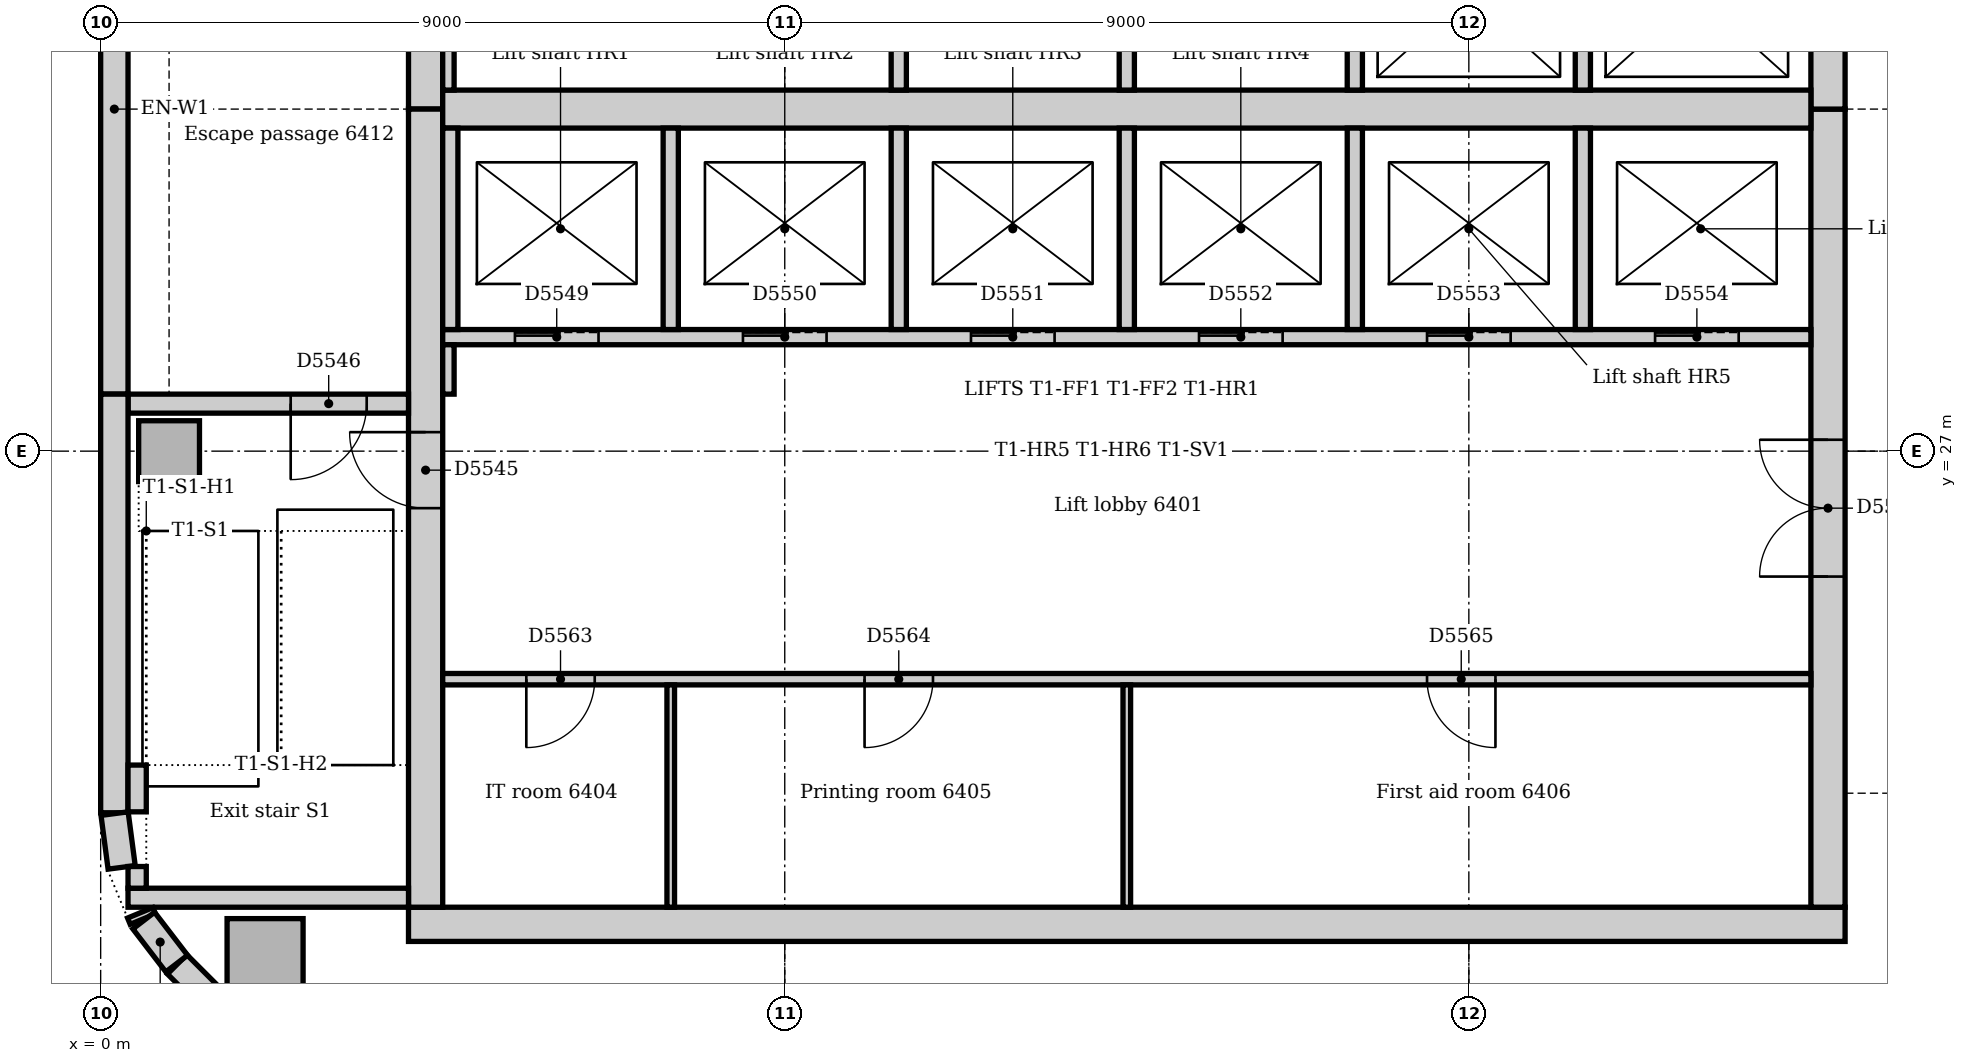
"""IFC4 building model, lengths in metres.
Left out: names, types, materials, properties, quantities, classifications, styles, units other than length and angle.
Written with IfcOpenShell. Run it as: python <this file> out.ifc"""

import sys

from ifc_helpers import new_model, si_unit, direction, frame, frame_2d, origin, origin_2d, place, context, subcontext, project, spatial, rectangle, extrude, element, fill, save


model = new_model("IFC4")
c1 = context("Model", 3, precision=1e-05, world=origin(), true_north=direction((0.0, 1.0)))
c2 = subcontext(c1, "Body", "Model", "MODEL_VIEW")
j1 = project(units=[si_unit("LENGTHUNIT", "METRE"), si_unit("PLANEANGLEUNIT", "RADIAN")], contexts=[c1])
p1 = place(None, origin())
s1 = spatial("IfcSite", under=j1, at=p1, CompositionType="ELEMENT")
p2 = place(p1, origin())
s2 = spatial("IfcBuilding", under=s1, at=p2, CompositionType="ELEMENT")
p3 = place(p2, frame((0.0, 0.0, 267.0)))
s3 = spatial("IfcBuildingStorey", under=s2, at=p3, CompositionType="ELEMENT", Elevation=267.0)
p4 = place(p3, frame((4.05, 20.775, 0.0), z_axis=(0.0, 0.0, 1.0), x_axis=(1.0, 0.0, 0.0)))
e1 = element("IfcWall", 1, at=p4, inside=s3, PredefinedType="SOLIDWALL", context=c2, shape_type="SweptSolid", body=[
    extrude(rectangle(XDim=18.9, YDim=0.45, at=frame_2d((9.45, 0.0))), origin(), (0.0, 0.0, 1.0), 4.0),
])
p5 = place(p3, frame((22.725, 21.0, 0.0), z_axis=(0.0, 0.0, 1.0), x_axis=(0.0, 1.0, 0.0)))
e2 = element("IfcWall", 2, at=p5, inside=s3, PredefinedType="SOLIDWALL", context=c2, shape_type="SweptSolid", body=[
    extrude(rectangle(XDim=10.5, YDim=0.45, at=frame_2d((5.25, 0.0))), origin(), (0.0, 0.0, 1.0), 4.0),
])
p6 = place(p5, frame((4.35, 0.0, 0.0)))
e3 = element("IfcOpeningElement", 3, at=p6, cuts=e2, PredefinedType="OPENING", context=c2, shape_type="SweptSolid", body=[
    extrude(rectangle(XDim=1.8, YDim=2.1, at=frame_2d((0.9, 1.05))), frame((0.0, 0.235, 0.0), z_axis=(0.0, -1.0, 0.0), x_axis=(1.0, 0.0, 0.0)), (0.0, 0.0, 1.0), 0.47),
])
p7 = place(p3, frame((22.725, 31.5, 0.0), z_axis=(0.0, 0.0, 1.0), x_axis=(0.0, 1.0, 0.0)))
e4 = element("IfcWall", 4, at=p7, inside=s3, PredefinedType="SOLIDWALL", context=c2, shape_type="SweptSolid", body=[
    extrude(rectangle(XDim=10.5, YDim=0.45, at=frame_2d((5.25, 0.0))), origin(), (0.0, 0.0, 1.0), 4.0),
])
p8 = place(p7, frame((3.15, 0.0, 0.0)))
e5 = element("IfcOpeningElement", 5, at=p8, cuts=e4, PredefinedType="OPENING", context=c2, shape_type="SweptSolid", body=[
    extrude(rectangle(XDim=1.0, YDim=2.1, at=frame_2d((0.5, 1.05))), frame((0.0, 0.235, 0.0), z_axis=(0.0, -1.0, 0.0), x_axis=(1.0, 0.0, 0.0)), (0.0, 0.0, 1.0), 0.47),
])
p9 = place(p7, frame((5.2, 0.0, 0.0)))
e6 = element("IfcOpeningElement", 6, at=p9, cuts=e4, PredefinedType="OPENING", context=c2, shape_type="SweptSolid", body=[
    extrude(rectangle(XDim=1.0, YDim=2.1, at=frame_2d((0.5, 1.05))), frame((0.0, 0.235, 0.0), z_axis=(0.0, -1.0, 0.0), x_axis=(1.0, 0.0, 0.0)), (0.0, 0.0, 1.0), 0.47),
])
p10 = place(p3, frame((4.275, 42.0, 0.0), z_axis=(0.0, 0.0, 1.0), x_axis=(0.0, -1.0, 0.0)))
e7 = element("IfcWall", 7, at=p10, inside=s3, PredefinedType="SOLIDWALL", context=c2, shape_type="SweptSolid", body=[
    extrude(rectangle(XDim=10.5, YDim=0.45, at=frame_2d((5.25, 0.0))), origin(), (0.0, 0.0, 1.0), 4.0),
])
p11 = place(p10, frame((5.3, 0.0, 0.0)))
e8 = element("IfcOpeningElement", 8, at=p11, cuts=e7, PredefinedType="OPENING", context=c2, shape_type="SweptSolid", body=[
    extrude(rectangle(XDim=1.0, YDim=2.1, at=frame_2d((0.5, 1.05))), frame((0.0, 0.235, 0.0), z_axis=(0.0, -1.0, 0.0), x_axis=(1.0, 0.0, 0.0)), (0.0, 0.0, 1.0), 0.47),
])
p12 = place(p3, frame((4.275, 31.5, 0.0), z_axis=(0.0, 0.0, 1.0), x_axis=(0.0, -1.0, 0.0)))
e9 = element("IfcWall", 9, at=p12, inside=s3, PredefinedType="SOLIDWALL", context=c2, shape_type="SweptSolid", body=[
    extrude(rectangle(XDim=10.5, YDim=0.45, at=frame_2d((5.25, 0.0))), origin(), (0.0, 0.0, 1.0), 4.0),
])
p13 = place(p12, frame((4.25, 0.0, 0.0)))
e10 = element("IfcOpeningElement", 10, at=p13, cuts=e9, PredefinedType="OPENING", context=c2, shape_type="SweptSolid", body=[
    extrude(rectangle(XDim=1.0, YDim=2.1, at=frame_2d((0.5, 1.05))), frame((0.0, 0.235, 0.0), z_axis=(0.0, -1.0, 0.0), x_axis=(1.0, 0.0, 0.0)), (0.0, 0.0, 1.0), 0.47),
])
p14 = place(p3, frame((4.5, 31.5, 0.0), z_axis=(0.0, 0.0, 1.0), x_axis=(1.0, 0.0, 0.0)))
e11 = element("IfcWall", 11, at=p14, inside=s3, PredefinedType="SOLIDWALL", context=c2, shape_type="SweptSolid", body=[
    extrude(rectangle(XDim=18.0, YDim=0.5, at=frame_2d((9.0, 0.0))), origin(), (0.0, 0.0, 1.0), 4.0),
])
p15 = place(p3, frame((0.36, 21.125, 0.0), z_axis=(0.0, 0.0, 1.0), x_axis=(1.0, 0.0, 0.0)))
e12 = element("IfcWall", 12, at=p15, inside=s3, PredefinedType="SOLIDWALL", context=c2, shape_type="SweptSolid", body=[
    extrude(rectangle(XDim=3.69, YDim=0.25, at=frame_2d((1.845, 0.0))), origin(), (0.0, 0.0, 1.0), 4.0),
])
p16 = place(p3, frame((4.05, 27.625, 0.0), z_axis=(0.0, 0.0, 1.0), x_axis=(-1.0, 0.0, 0.0)))
e13 = element("IfcWall", 13, at=p16, inside=s3, PredefinedType="SOLIDWALL", context=c2, shape_type="SweptSolid", body=[
    extrude(rectangle(XDim=3.69, YDim=0.25, at=frame_2d((1.845, 0.0))), origin(), (0.0, 0.0, 1.0), 4.0),
])
p17 = place(p16, frame((0.55, 0.0, 0.0)))
e14 = element("IfcOpeningElement", 14, at=p17, cuts=e13, PredefinedType="OPENING", context=c2, shape_type="SweptSolid", body=[
    extrude(rectangle(XDim=1.0, YDim=2.1, at=frame_2d((0.5, 1.05))), frame((0.0, 0.135, 0.0), z_axis=(0.0, -1.0, 0.0), x_axis=(1.0, 0.0, 0.0)), (0.0, 0.0, 1.0), 0.27),
])
p18 = place(p3, frame((2.163, 20.35, 0.0), z_axis=(0.0, 0.0, 1.0), x_axis=(1.0, 0.0, 0.0)))
e15 = element("IfcColumn", 15, at=p18, inside=s3, PredefinedType="COLUMN", context=c2, shape_type="SweptSolid", body=[
    extrude(rectangle(XDim=1.0, YDim=1.0, at=origin_2d()), origin(), (0.0, 0.0, 1.0), 3.85),
])
p19 = place(p3, frame((0.9, 27.0, 0.0), z_axis=(0.0, 0.0, 1.0), x_axis=(1.0, 0.0, 0.0)))
e16 = element("IfcColumn", 16, at=p19, inside=s3, PredefinedType="COLUMN", context=c2, shape_type="SweptSolid", body=[
    extrude(rectangle(XDim=0.8, YDim=0.8, at=origin_2d()), origin(), (0.0, 0.0, 1.0), 4.0),
])
p20 = place(p3, frame((0.18, 35.25, 0.0), z_axis=(0.0, 0.0, 1.0), x_axis=(0.0, -1.0, 0.0)))
e17 = element("IfcWall", 17, at=p20, inside=s3, PredefinedType="STANDARD", context=c2, shape_type="SweptSolid", body=[
    extrude(rectangle(XDim=7.5, YDim=0.36, at=frame_2d((3.75, 0.0))), origin(), (0.0, 0.0, 1.0), 3.85),
])
p21 = place(p3, frame((0.18, 27.75, 0.0), z_axis=(0.0, 0.0, 1.0), x_axis=(0.0, -1.0, 0.0)))
e18 = element("IfcWall", 18, at=p21, inside=s3, PredefinedType="STANDARD", context=c2, shape_type="SweptSolid", body=[
    extrude(rectangle(XDim=5.507, YDim=0.36, at=frame_2d((2.754, 0.0))), origin(), (0.0, 0.0, 1.0), 3.85),
])
p22 = place(p3, frame((1.006, 20.249, 0.0), z_axis=(0.0, 0.0, 1.0), x_axis=(0.707106781187, -0.707106781187, 0.0)))
e19 = element("IfcWall", 19, at=p22, inside=s3, PredefinedType="STANDARD", context=c2, shape_type="SweptSolid", body=[
    extrude(rectangle(XDim=1.757, YDim=0.36, at=frame_2d((0.879, 0.0))), origin(), (0.0, 0.0, 1.0), 3.85),
])
p23 = place(p3, frame((0.183, 22.231, 0.0), z_axis=(0.0, 0.0, 1.0), x_axis=(0.13055608231, -0.99144092581, 0.0)))
e20 = element("IfcWall", 20, at=p23, inside=s3, PredefinedType="STANDARD", context=c2, shape_type="SweptSolid", body=[
    extrude(rectangle(XDim=0.713, YDim=0.36, at=frame_2d((0.356, 0.0))), origin(), (0.0, 0.0, 1.0), 3.85),
])
p24 = place(p3, frame((0.521, 20.927, 0.0), z_axis=(0.0, 0.0, 1.0), x_axis=(0.382549378284, -0.923935048136, 0.0)))
e21 = element("IfcWall", 21, at=p24, inside=s3, PredefinedType="STANDARD", context=c2, shape_type="SweptSolid", body=[
    extrude(rectangle(XDim=0.089, YDim=0.36, at=frame_2d((0.045, 0.0))), origin(), (0.0, 0.0, 1.0), 3.85),
])
p25 = place(p3, frame((0.566, 20.825, 0.0), z_axis=(0.0, 0.0, 1.0), x_axis=(0.608802368033, -0.793321924995, 0.0)))
e22 = element("IfcWall", 22, at=p25, inside=s3, PredefinedType="STANDARD", context=c2, shape_type="SweptSolid", body=[
    extrude(rectangle(XDim=0.713, YDim=0.36, at=frame_2d((0.357, 0.0))), origin(), (0.0, 0.0, 1.0), 3.85),
])
p26 = place(p3, frame((0.48, 21.25, 0.0), z_axis=(0.0, 0.0, 1.0), x_axis=(0.0, 1.0, 0.0)))
e23 = element("IfcWall", 23, at=p26, inside=s3, PredefinedType="STANDARD", context=c2, shape_type="SweptSolid", body=[
    extrude(rectangle(XDim=0.285, YDim=0.24, at=frame_2d((0.143, 0.0))), origin(), (0.0, 0.0, 1.0), 4.0),
])
p27 = place(p3, frame((0.48, 22.255, 0.0), z_axis=(0.0, 0.0, 1.0), x_axis=(0.0, 1.0, 0.0)))
e24 = element("IfcWall", 24, at=p27, inside=s3, PredefinedType="STANDARD", context=c2, shape_type="SweptSolid", body=[
    extrude(rectangle(XDim=0.615, YDim=0.24, at=frame_2d((0.307, 0.0))), origin(), (0.0, 0.0, 1.0), 4.0),
])
p28 = place(p3, frame((4.5, 28.5, 0.0), z_axis=(0.0, 0.0, 1.0), x_axis=(1.0, 0.0, 0.0)))
e25 = element("IfcWall", 25, at=p28, inside=s3, PredefinedType="PARTITIONING", context=c2, shape_type="SweptSolid", body=[
    extrude(rectangle(XDim=18.0, YDim=0.2, at=frame_2d((9.0, 0.0))), origin(), (0.0, 0.0, 1.0), 3.85),
])
p29 = place(p28, frame((0.95, 0.0, 0.0)))
e26 = element("IfcOpeningElement", 26, at=p29, cuts=e25, PredefinedType="OPENING", context=c2, shape_type="SweptSolid", body=[
    extrude(rectangle(XDim=1.1, YDim=2.1, at=frame_2d((0.55, 1.05))), frame((0.0, 0.11, 0.0), z_axis=(0.0, -1.0, 0.0), x_axis=(1.0, 0.0, 0.0)), (0.0, 0.0, 1.0), 0.22),
])
p30 = place(p28, frame((3.95, 0.0, 0.0)))
e27 = element("IfcOpeningElement", 27, at=p30, cuts=e25, PredefinedType="OPENING", context=c2, shape_type="SweptSolid", body=[
    extrude(rectangle(XDim=1.1, YDim=2.1, at=frame_2d((0.55, 1.05))), frame((0.0, 0.11, 0.0), z_axis=(0.0, -1.0, 0.0), x_axis=(1.0, 0.0, 0.0)), (0.0, 0.0, 1.0), 0.22),
])
p31 = place(p28, frame((6.95, 0.0, 0.0)))
e28 = element("IfcOpeningElement", 28, at=p31, cuts=e25, PredefinedType="OPENING", context=c2, shape_type="SweptSolid", body=[
    extrude(rectangle(XDim=1.1, YDim=2.1, at=frame_2d((0.55, 1.05))), frame((0.0, 0.11, 0.0), z_axis=(0.0, -1.0, 0.0), x_axis=(1.0, 0.0, 0.0)), (0.0, 0.0, 1.0), 0.22),
])
p32 = place(p28, frame((9.95, 0.0, 0.0)))
e29 = element("IfcOpeningElement", 29, at=p32, cuts=e25, PredefinedType="OPENING", context=c2, shape_type="SweptSolid", body=[
    extrude(rectangle(XDim=1.1, YDim=2.1, at=frame_2d((0.55, 1.05))), frame((0.0, 0.11, 0.0), z_axis=(0.0, -1.0, 0.0), x_axis=(1.0, 0.0, 0.0)), (0.0, 0.0, 1.0), 0.22),
])
p33 = place(p28, frame((12.95, 0.0, 0.0)))
e30 = element("IfcOpeningElement", 30, at=p33, cuts=e25, PredefinedType="OPENING", context=c2, shape_type="SweptSolid", body=[
    extrude(rectangle(XDim=1.1, YDim=2.1, at=frame_2d((0.55, 1.05))), frame((0.0, 0.11, 0.0), z_axis=(0.0, -1.0, 0.0), x_axis=(1.0, 0.0, 0.0)), (0.0, 0.0, 1.0), 0.22),
])
p34 = place(p28, frame((15.95, 0.0, 0.0)))
e31 = element("IfcOpeningElement", 31, at=p34, cuts=e25, PredefinedType="OPENING", context=c2, shape_type="SweptSolid", body=[
    extrude(rectangle(XDim=1.1, YDim=2.1, at=frame_2d((0.55, 1.05))), frame((0.0, 0.11, 0.0), z_axis=(0.0, -1.0, 0.0), x_axis=(1.0, 0.0, 0.0)), (0.0, 0.0, 1.0), 0.22),
])
for number, where, z_axis, x_axis in (
    (32, (10.5, 28.6, 0.0), (0.0, 0.0, 1.0), (0.0, 1.0, 0.0)),
    (33, (10.5, 31.75, 0.0), (0.0, 0.0, 1.0), (0.0, 1.0, 0.0)),
    (34, (13.5, 28.6, 0.0), (0.0, 0.0, 1.0), (0.0, 1.0, 0.0)),
    (35, (13.5, 31.75, 0.0), (0.0, 0.0, 1.0), (0.0, 1.0, 0.0)),
    (36, (16.5, 28.6, 0.0), (0.0, 0.0, 1.0), (0.0, 1.0, 0.0)),
    (37, (16.5, 31.75, 0.0), (0.0, 0.0, 1.0), (0.0, 1.0, 0.0)),
    (38, (19.5, 28.6, 0.0), (0.0, 0.0, 1.0), (0.0, 1.0, 0.0)),
    (39, (19.5, 31.75, 0.0), (0.0, 0.0, 1.0), (0.0, 1.0, 0.0)),
    (40, (4.6, 28.6, 0.0), (0.0, 0.0, 1.0), (0.0, 1.0, 0.0)),
    (41, (7.5, 28.6, 0.0), (0.0, 0.0, 1.0), (0.0, 1.0, 0.0)),
):
    element("IfcWall", number, at=place(p3, frame(where, z_axis=z_axis, x_axis=x_axis)), inside=s3, PredefinedType="PARTITIONING", context=c2, shape_type="SweptSolid", body=[
        extrude(rectangle(XDim=2.65, YDim=0.2, at=frame_2d((1.325, 0.0))), origin(), (0.0, 0.0, 1.0), 3.85),
    ])
p35 = place(p3, frame((4.5, 24.0, 0.0), z_axis=(0.0, 0.0, 1.0), x_axis=(1.0, 0.0, 0.0)))
e42 = element("IfcWall", 42, at=p35, inside=s3, PredefinedType="PARTITIONING", context=c2, shape_type="SweptSolid", body=[
    extrude(rectangle(XDim=18.0, YDim=0.15, at=frame_2d((9.0, 0.0))), origin(), (0.0, 0.0, 1.0), 3.85),
])
p36 = place(p35, frame((1.1, 0.0, 0.0)))
e43 = element("IfcOpeningElement", 43, at=p36, cuts=e42, PredefinedType="OPENING", context=c2, shape_type="SweptSolid", body=[
    extrude(rectangle(XDim=0.9, YDim=2.1, at=frame_2d((0.45, 1.05))), frame((0.0, 0.085, 0.0), z_axis=(0.0, -1.0, 0.0), x_axis=(1.0, 0.0, 0.0)), (0.0, 0.0, 1.0), 0.17),
])
p37 = place(p35, frame((5.55, 0.0, 0.0)))
e44 = element("IfcOpeningElement", 44, at=p37, cuts=e42, PredefinedType="OPENING", context=c2, shape_type="SweptSolid", body=[
    extrude(rectangle(XDim=0.9, YDim=2.1, at=frame_2d((0.45, 1.05))), frame((0.0, 0.085, 0.0), z_axis=(0.0, -1.0, 0.0), x_axis=(1.0, 0.0, 0.0)), (0.0, 0.0, 1.0), 0.17),
])
p38 = place(p35, frame((12.95, 0.0, 0.0)))
e45 = element("IfcOpeningElement", 45, at=p38, cuts=e42, PredefinedType="OPENING", context=c2, shape_type="SweptSolid", body=[
    extrude(rectangle(XDim=0.9, YDim=2.1, at=frame_2d((0.45, 1.05))), frame((0.0, 0.085, 0.0), z_axis=(0.0, -1.0, 0.0), x_axis=(1.0, 0.0, 0.0)), (0.0, 0.0, 1.0), 0.17),
])
p39 = place(p3, frame((4.575, 31.75, 0.0), z_axis=(0.0, 0.0, 1.0), x_axis=(0.0, 1.0, 0.0)))
e46 = element("IfcWall", 46, at=p39, inside=s3, PredefinedType="PARTITIONING", context=c2, shape_type="SweptSolid", body=[
    extrude(rectangle(XDim=2.675, YDim=0.15, at=frame_2d((1.337, 0.0))), origin(), (0.0, 0.0, 1.0), 3.85),
])
p40 = place(p3, frame((4.575, 27.75, 0.0), z_axis=(0.0, 0.0, 1.0), x_axis=(0.0, 1.0, 0.0)))
e47 = element("IfcWall", 47, at=p40, inside=s3, PredefinedType="PARTITIONING", context=c2, shape_type="SweptSolid", body=[
    extrude(rectangle(XDim=0.65, YDim=0.15, at=frame_2d((0.325, 0.0))), origin(), (0.0, 0.0, 1.0), 3.85),
])
for number, where, z_axis, x_axis in (
    (48, (7.5, 21.0, 0.0), (0.0, 0.0, 1.0), (0.0, 1.0, 0.0)),
    (49, (13.5, 21.0, 0.0), (0.0, 0.0, 1.0), (0.0, 1.0, 0.0)),
):
    element("IfcWall", number, at=place(p3, frame(where, z_axis=z_axis, x_axis=x_axis)), inside=s3, PredefinedType="PARTITIONING", context=c2, shape_type="SweptSolid", body=[
        extrude(rectangle(XDim=2.925, YDim=0.1, at=frame_2d((1.462, 0.0))), origin(), (0.0, 0.0, 1.0), 3.85),
    ])
p41 = place(p13, frame((1.0, 0.0, 0.0), z_axis=(0.0, 0.0, 1.0), x_axis=(-1.0, 0.0, 0.0)))
e50 = element("IfcDoor", 50, at=p41, inside=s3, OperationType="SINGLE_SWING_RIGHT", PredefinedType="DOOR", context=c2, shape_type="SweptSolid", body=[
    extrude(rectangle(XDim=1.0, YDim=2.1, at=frame_2d((0.5, 1.05))), frame((0.0, 0.025, 0.0), z_axis=(0.0, -1.0, 0.0), x_axis=(1.0, 0.0, 0.0)), (0.0, 0.0, 1.0), 0.05),
])
fill(e10, e50)
p42 = place(p17, origin())
e51 = element("IfcDoor", 51, at=p42, inside=s3, OperationType="SINGLE_SWING_RIGHT", PredefinedType="DOOR", context=c2, shape_type="SweptSolid", body=[
    extrude(rectangle(XDim=1.0, YDim=2.1, at=frame_2d((0.5, 1.05))), frame((0.0, 0.025, 0.0), z_axis=(0.0, -1.0, 0.0), x_axis=(1.0, 0.0, 0.0)), (0.0, 0.0, 1.0), 0.05),
])
fill(e14, e51)
p43 = place(p29, origin())
e52 = element("IfcDoor", 52, at=p43, inside=s3, OperationType="SLIDING_TO_LEFT", PredefinedType="DOOR", context=c2, shape_type="SweptSolid", body=[
    extrude(rectangle(XDim=1.1, YDim=2.1, at=frame_2d((0.55, 1.05))), frame((0.0, 0.025, 0.0), z_axis=(0.0, -1.0, 0.0), x_axis=(1.0, 0.0, 0.0)), (0.0, 0.0, 1.0), 0.05),
])
fill(e26, e52)
p44 = place(p30, origin())
e53 = element("IfcDoor", 53, at=p44, inside=s3, OperationType="SLIDING_TO_LEFT", PredefinedType="DOOR", context=c2, shape_type="SweptSolid", body=[
    extrude(rectangle(XDim=1.1, YDim=2.1, at=frame_2d((0.55, 1.05))), frame((0.0, 0.025, 0.0), z_axis=(0.0, -1.0, 0.0), x_axis=(1.0, 0.0, 0.0)), (0.0, 0.0, 1.0), 0.05),
])
fill(e27, e53)
p45 = place(p31, origin())
e54 = element("IfcDoor", 54, at=p45, inside=s3, OperationType="SLIDING_TO_LEFT", PredefinedType="DOOR", context=c2, shape_type="SweptSolid", body=[
    extrude(rectangle(XDim=1.1, YDim=2.1, at=frame_2d((0.55, 1.05))), frame((0.0, 0.025, 0.0), z_axis=(0.0, -1.0, 0.0), x_axis=(1.0, 0.0, 0.0)), (0.0, 0.0, 1.0), 0.05),
])
fill(e28, e54)
p46 = place(p32, origin())
e55 = element("IfcDoor", 55, at=p46, inside=s3, OperationType="SLIDING_TO_LEFT", PredefinedType="DOOR", context=c2, shape_type="SweptSolid", body=[
    extrude(rectangle(XDim=1.1, YDim=2.1, at=frame_2d((0.55, 1.05))), frame((0.0, 0.025, 0.0), z_axis=(0.0, -1.0, 0.0), x_axis=(1.0, 0.0, 0.0)), (0.0, 0.0, 1.0), 0.05),
])
fill(e29, e55)
p47 = place(p33, origin())
e56 = element("IfcDoor", 56, at=p47, inside=s3, OperationType="SLIDING_TO_LEFT", PredefinedType="DOOR", context=c2, shape_type="SweptSolid", body=[
    extrude(rectangle(XDim=1.1, YDim=2.1, at=frame_2d((0.55, 1.05))), frame((0.0, 0.025, 0.0), z_axis=(0.0, -1.0, 0.0), x_axis=(1.0, 0.0, 0.0)), (0.0, 0.0, 1.0), 0.05),
])
fill(e30, e56)
p48 = place(p34, origin())
e57 = element("IfcDoor", 57, at=p48, inside=s3, OperationType="SLIDING_TO_LEFT", PredefinedType="DOOR", context=c2, shape_type="SweptSolid", body=[
    extrude(rectangle(XDim=1.1, YDim=2.1, at=frame_2d((0.55, 1.05))), frame((0.0, 0.025, 0.0), z_axis=(0.0, -1.0, 0.0), x_axis=(1.0, 0.0, 0.0)), (0.0, 0.0, 1.0), 0.05),
])
fill(e31, e57)
p49 = place(p6, origin())
e58 = element("IfcDoor", 58, at=p49, inside=s3, OperationType="DOUBLE_DOOR_DOUBLE_SWING", PredefinedType="DOOR", context=c2, shape_type="SweptSolid", body=[
    extrude(rectangle(XDim=1.8, YDim=2.1, at=frame_2d((0.9, 1.05))), frame((0.0, 0.025, 0.0), z_axis=(0.0, -1.0, 0.0), x_axis=(1.0, 0.0, 0.0)), (0.0, 0.0, 1.0), 0.05),
])
fill(e3, e58)
p50 = place(p36, frame((0.9, 0.0, 0.0), z_axis=(0.0, 0.0, 1.0), x_axis=(-1.0, 0.0, 0.0)))
e59 = element("IfcDoor", 59, at=p50, inside=s3, OperationType="SINGLE_SWING_RIGHT", PredefinedType="DOOR", context=c2, shape_type="SweptSolid", body=[
    extrude(rectangle(XDim=0.9, YDim=2.1, at=frame_2d((0.45, 1.05))), frame((0.0, 0.025, 0.0), z_axis=(0.0, -1.0, 0.0), x_axis=(1.0, 0.0, 0.0)), (0.0, 0.0, 1.0), 0.05),
])
fill(e43, e59)
p51 = place(p37, frame((0.9, 0.0, 0.0), z_axis=(0.0, 0.0, 1.0), x_axis=(-1.0, 0.0, 0.0)))
e60 = element("IfcDoor", 60, at=p51, inside=s3, OperationType="SINGLE_SWING_RIGHT", PredefinedType="DOOR", context=c2, shape_type="SweptSolid", body=[
    extrude(rectangle(XDim=0.9, YDim=2.1, at=frame_2d((0.45, 1.05))), frame((0.0, 0.025, 0.0), z_axis=(0.0, -1.0, 0.0), x_axis=(1.0, 0.0, 0.0)), (0.0, 0.0, 1.0), 0.05),
])
fill(e44, e60)
p52 = place(p38, frame((0.9, 0.0, 0.0), z_axis=(0.0, 0.0, 1.0), x_axis=(-1.0, 0.0, 0.0)))
e61 = element("IfcDoor", 61, at=p52, inside=s3, OperationType="SINGLE_SWING_LEFT", PredefinedType="DOOR", context=c2, shape_type="SweptSolid", body=[
    extrude(rectangle(XDim=0.9, YDim=2.1, at=frame_2d((0.45, 1.05))), frame((0.0, 0.025, 0.0), z_axis=(0.0, -1.0, 0.0), x_axis=(1.0, 0.0, 0.0)), (0.0, 0.0, 1.0), 0.05),
])
fill(e45, e61)
save(model, sys.argv[1])
